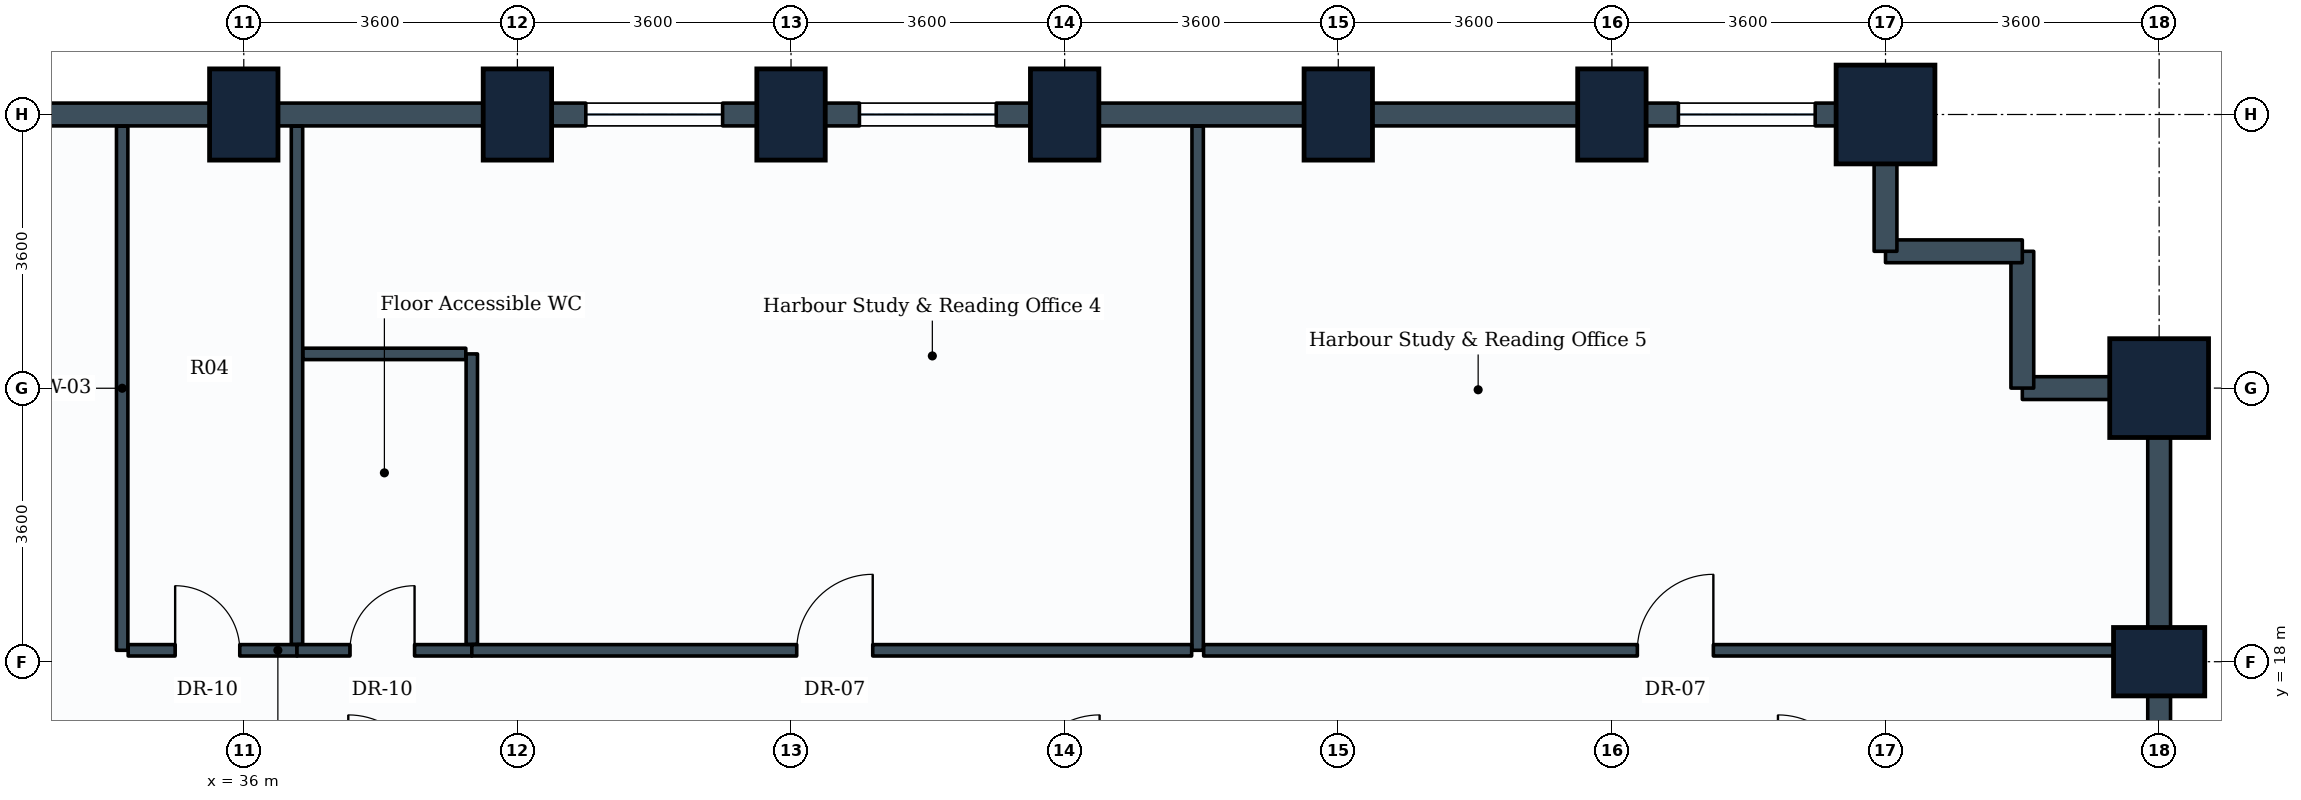
"""IFC4 building model, lengths in metres.
Left out: names, types, materials, properties, quantities, classifications, styles, units other than length and angle.
Written with IfcOpenShell. Run it as: python <this file> out.ifc"""

import sys

from ifc_helpers import new_model, si_unit, direction, frame, frame_2d, origin, origin_2d, place, context, subcontext, project, spatial, rectangle, extrude, element, fill, save


model = new_model("IFC4")
c1 = context("Model", 3, precision=1e-05, world=origin(), true_north=direction((0.0, 1.0)))
c2 = subcontext(c1, "Body", "Model", "MODEL_VIEW")
j1 = project(units=[si_unit("LENGTHUNIT", "METRE"), si_unit("PLANEANGLEUNIT", "RADIAN")], contexts=[c1])
p1 = place(None, origin())
s1 = spatial("IfcSite", under=j1, at=p1, CompositionType="ELEMENT")
p2 = place(p1, origin())
s2 = spatial("IfcBuilding", under=s1, at=p2, CompositionType="ELEMENT")
p3 = place(p2, frame((0.0, 0.0, 63.0)))
s3 = spatial("IfcBuildingStorey", under=s2, at=p3, CompositionType="ELEMENT", Elevation=63.0)
for number, where, z_axis, x_axis in (
    (1, (36.0, 25.2, 0.0), (0.0, 0.0, 1.0), (1.0, 0.0, 0.0)),
    (2, (39.6, 25.2, 0.0), (0.0, 0.0, 1.0), (1.0, 0.0, 0.0)),
    (3, (43.2, 25.2, 0.0), (0.0, 0.0, 1.0), (1.0, 0.0, 0.0)),
    (4, (46.8, 25.2, 0.0), (0.0, 0.0, 1.0), (1.0, 0.0, 0.0)),
    (5, (50.4, 25.2, 0.0), (0.0, 0.0, 1.0), (1.0, 0.0, 0.0)),
    (6, (54.0, 25.2, 0.0), (0.0, 0.0, 1.0), (1.0, 0.0, 0.0)),
):
    element("IfcColumn", number, at=place(p3, frame(where, z_axis=z_axis, x_axis=x_axis)), inside=s3, PredefinedType="COLUMN", context=c2, shape_type="SweptSolid", body=[
        extrude(rectangle(XDim=0.9, YDim=1.2, at=origin_2d()), origin(), (0.0, 0.0, 1.0), 3.9),
    ])
p4 = place(p3, frame((57.6, 25.2, 0.0), z_axis=(0.0, 0.0, 1.0), x_axis=(1.0, 0.0, 0.0)))
e7 = element("IfcColumn", 7, at=p4, inside=s3, PredefinedType="COLUMN", context=c2, shape_type="SweptSolid", body=[
    extrude(rectangle(XDim=1.3, YDim=1.3, at=origin_2d()), origin(), (0.0, 0.0, 1.0), 3.9),
])
p5 = place(p3, frame((61.2, 18.0, 0.0), z_axis=(0.0, 0.0, 1.0), x_axis=(0.0, 1.0, 0.0)))
e8 = element("IfcColumn", 8, at=p5, inside=s3, PredefinedType="COLUMN", context=c2, shape_type="SweptSolid", body=[
    extrude(rectangle(XDim=0.9, YDim=1.2, at=origin_2d()), origin(), (0.0, 0.0, 1.0), 3.9),
])
p6 = place(p3, frame((61.2, 21.6, 0.0), z_axis=(0.0, 0.0, 1.0), x_axis=(0.0, 1.0, 0.0)))
e9 = element("IfcColumn", 9, at=p6, inside=s3, PredefinedType="COLUMN", context=c2, shape_type="SweptSolid", body=[
    extrude(rectangle(XDim=1.3, YDim=1.3, at=origin_2d()), origin(), (0.0, 0.0, 1.0), 3.9),
])
for number, where, z_axis, x_axis in (
    (10, (61.2, 18.0, 0.0), (0.0, 0.0, 1.0), (0.0, -1.0, 0.0)),
    (11, (61.2, 21.6, 0.0), (0.0, 0.0, 1.0), (0.0, -1.0, 0.0)),
):
    element("IfcWall", number, at=place(p3, frame(where, z_axis=z_axis, x_axis=x_axis)), inside=s3, PredefinedType="STANDARD", context=c2, shape_type="SweptSolid", body=[
        extrude(rectangle(XDim=3.6, YDim=0.3, at=frame_2d((1.8, 0.0))), origin(), (0.0, 0.0, 1.0), 2.93),
    ])
p7 = place(p3, frame((61.2, 21.6, 0.0), z_axis=(0.0, 0.0, 1.0), x_axis=(-1.0, 0.0, 0.0)))
e12 = element("IfcWall", 12, at=p7, inside=s3, PredefinedType="STANDARD", context=c2, shape_type="SweptSolid", body=[
    extrude(rectangle(XDim=1.8, YDim=0.3, at=frame_2d((0.9, 0.0))), origin(), (0.0, 0.0, 1.0), 2.93),
])
for number, where, z_axis, x_axis in (
    (13, (59.4, 23.4, 0.0), (0.0, 0.0, 1.0), (0.0, -1.0, 0.0)),
    (14, (57.6, 23.4, 0.0), (0.0, 0.0, 1.0), (1.0, 0.0, 0.0)),
):
    element("IfcWall", number, at=place(p3, frame(where, z_axis=z_axis, x_axis=x_axis)), inside=s3, PredefinedType="STANDARD", context=c2, shape_type="SweptSolid", body=[
        extrude(rectangle(XDim=1.8, YDim=0.3, at=frame_2d((0.9, 0.0))), origin(), (0.0, 0.0, 1.0), 3.635),
    ])
p8 = place(p3, frame((57.6, 25.2, 0.0), z_axis=(0.0, 0.0, 1.0), x_axis=(0.0, -1.0, 0.0)))
e15 = element("IfcWall", 15, at=p8, inside=s3, PredefinedType="STANDARD", context=c2, shape_type="SweptSolid", body=[
    extrude(rectangle(XDim=1.8, YDim=0.3, at=frame_2d((0.9, 0.0))), origin(), (0.0, 0.0, 1.0), 2.93),
])
p9 = place(p3, frame((54.0, 25.2, 0.0), z_axis=(0.0, 0.0, 1.0), x_axis=(1.0, 0.0, 0.0)))
e16 = element("IfcWall", 16, at=p9, inside=s3, PredefinedType="STANDARD", context=c2, shape_type="SweptSolid", body=[
    extrude(rectangle(XDim=3.6, YDim=0.3, at=frame_2d((1.8, 0.0))), origin(), (0.0, 0.0, 1.0), 2.93),
])
p10 = place(p9, frame((0.875, 0.0, 0.85)))
e17 = element("IfcOpeningElement", 17, at=p10, cuts=e16, PredefinedType="OPENING", context=c2, shape_type="SweptSolid", body=[
    extrude(rectangle(XDim=1.8, YDim=1.35, at=frame_2d((0.9, 0.675))), frame((0.0, 0.16, 0.0), z_axis=(0.0, -1.0, 0.0), x_axis=(1.0, 0.0, 0.0)), (0.0, 0.0, 1.0), 0.32),
])
p11 = place(p3, frame((50.4, 25.2, 0.0), z_axis=(0.0, 0.0, 1.0), x_axis=(1.0, 0.0, 0.0)))
e18 = element("IfcWall", 18, at=p11, inside=s3, PredefinedType="STANDARD", context=c2, shape_type="SweptSolid", body=[
    extrude(rectangle(XDim=3.6, YDim=0.3, at=frame_2d((1.8, 0.0))), origin(), (0.0, 0.0, 1.0), 2.93),
])
p12 = place(p3, frame((46.8, 25.2, 0.0), z_axis=(0.0, 0.0, 1.0), x_axis=(1.0, 0.0, 0.0)))
e19 = element("IfcWall", 19, at=p12, inside=s3, PredefinedType="STANDARD", context=c2, shape_type="SweptSolid", body=[
    extrude(rectangle(XDim=3.6, YDim=0.3, at=frame_2d((1.8, 0.0))), origin(), (0.0, 0.0, 1.0), 2.93),
])
p13 = place(p3, frame((43.2, 25.2, 0.0), z_axis=(0.0, 0.0, 1.0), x_axis=(1.0, 0.0, 0.0)))
e20 = element("IfcWall", 20, at=p13, inside=s3, PredefinedType="STANDARD", context=c2, shape_type="SweptSolid", body=[
    extrude(rectangle(XDim=3.6, YDim=0.3, at=frame_2d((1.8, 0.0))), origin(), (0.0, 0.0, 1.0), 2.93),
])
p14 = place(p13, frame((0.9, 0.0, 0.85)))
e21 = element("IfcOpeningElement", 21, at=p14, cuts=e20, PredefinedType="OPENING", context=c2, shape_type="SweptSolid", body=[
    extrude(rectangle(XDim=1.8, YDim=1.35, at=frame_2d((0.9, 0.675))), frame((0.0, 0.16, 0.0), z_axis=(0.0, -1.0, 0.0), x_axis=(1.0, 0.0, 0.0)), (0.0, 0.0, 1.0), 0.32),
])
p15 = place(p3, frame((39.6, 25.2, 0.0), z_axis=(0.0, 0.0, 1.0), x_axis=(1.0, 0.0, 0.0)))
e22 = element("IfcWall", 22, at=p15, inside=s3, PredefinedType="STANDARD", context=c2, shape_type="SweptSolid", body=[
    extrude(rectangle(XDim=3.6, YDim=0.3, at=frame_2d((1.8, 0.0))), origin(), (0.0, 0.0, 1.0), 2.93),
])
p16 = place(p15, frame((0.9, 0.0, 0.85)))
e23 = element("IfcOpeningElement", 23, at=p16, cuts=e22, PredefinedType="OPENING", context=c2, shape_type="SweptSolid", body=[
    extrude(rectangle(XDim=1.8, YDim=1.35, at=frame_2d((0.9, 0.675))), frame((0.0, 0.16, 0.0), z_axis=(0.0, -1.0, 0.0), x_axis=(1.0, 0.0, 0.0)), (0.0, 0.0, 1.0), 0.32),
])
for number, where, z_axis, x_axis in (
    (24, (36.0, 25.2, 0.0), (0.0, 0.0, 1.0), (1.0, 0.0, 0.0)),
    (25, (32.4, 25.2, 0.0), (0.0, 0.0, 1.0), (1.0, 0.0, 0.0)),
):
    element("IfcWall", number, at=place(p3, frame(where, z_axis=z_axis, x_axis=x_axis)), inside=s3, PredefinedType="STANDARD", context=c2, shape_type="SweptSolid", body=[
        extrude(rectangle(XDim=3.6, YDim=0.3, at=frame_2d((1.8, 0.0))), origin(), (0.0, 0.0, 1.0), 2.93),
    ])
p17 = place(p3, frame((34.4, 18.15, 0.0), z_axis=(0.0, 0.0, 1.0), x_axis=(0.0, 1.0, 0.0)))
e26 = element("IfcWall", 26, at=p17, inside=s3, PredefinedType="PARTITIONING", context=c2, shape_type="SweptSolid", body=[
    extrude(rectangle(XDim=6.896, YDim=0.15, at=frame_2d((3.448, 0.0))), origin(), (0.0, 0.0, 1.0), 2.93),
])
p18 = place(p3, frame((34.479, 18.15, 0.0), z_axis=(0.0, 0.0, 1.0), x_axis=(1.0, 0.0, 0.0)))
e27 = element("IfcWall", 27, at=p18, inside=s3, PredefinedType="PARTITIONING", context=c2, shape_type="SweptSolid", body=[
    extrude(rectangle(XDim=2.221, YDim=0.15, at=frame_2d((1.11, 0.0))), origin(), (0.0, 0.0, 1.0), 3.08),
])
p19 = place(p18, frame((0.618, 0.0, 0.0)))
e28 = element("IfcOpeningElement", 28, at=p19, cuts=e27, PredefinedType="OPENING", context=c2, shape_type="SweptSolid", body=[
    extrude(rectangle(XDim=0.85, YDim=2.1, at=frame_2d((0.425, 1.05))), frame((0.0, 0.085, 0.0), z_axis=(0.0, -1.0, 0.0), x_axis=(1.0, 0.0, 0.0)), (0.0, 0.0, 1.0), 0.17),
])
p20 = place(p3, frame((36.7, 18.229, 0.0), z_axis=(0.0, 0.0, 1.0), x_axis=(0.0, 1.0, 0.0)))
e29 = element("IfcWall", 29, at=p20, inside=s3, PredefinedType="PARTITIONING", context=c2, shape_type="SweptSolid", body=[
    extrude(rectangle(XDim=6.817, YDim=0.15, at=frame_2d((3.408, 0.0))), origin(), (0.0, 0.0, 1.0), 2.93),
])
p21 = place(p3, frame((36.7, 18.15, 0.0), z_axis=(0.0, 0.0, 1.0), x_axis=(1.0, 0.0, 0.0)))
e30 = element("IfcWall", 30, at=p21, inside=s3, PredefinedType="PARTITIONING", context=c2, shape_type="SweptSolid", body=[
    extrude(rectangle(XDim=2.3, YDim=0.15, at=frame_2d((1.15, 0.0))), origin(), (0.0, 0.0, 1.0), 3.08),
])
p22 = place(p21, frame((0.697, 0.0, 0.0)))
e31 = element("IfcOpeningElement", 31, at=p22, cuts=e30, PredefinedType="OPENING", context=c2, shape_type="SweptSolid", body=[
    extrude(rectangle(XDim=0.85, YDim=2.1, at=frame_2d((0.425, 1.05))), frame((0.0, 0.085, 0.0), z_axis=(0.0, -1.0, 0.0), x_axis=(1.0, 0.0, 0.0)), (0.0, 0.0, 1.0), 0.17),
])
p23 = place(p3, frame((39.0, 18.229, 0.0), z_axis=(0.0, 0.0, 1.0), x_axis=(0.0, 1.0, 0.0)))
e32 = element("IfcWall", 32, at=p23, inside=s3, PredefinedType="PARTITIONING", context=c2, shape_type="SweptSolid", body=[
    extrude(rectangle(XDim=3.821, YDim=0.15, at=frame_2d((1.911, 0.0))), origin(), (0.0, 0.0, 1.0), 3.03),
])
p24 = place(p3, frame((36.779, 22.05, 0.0), z_axis=(0.0, 0.0, 1.0), x_axis=(1.0, 0.0, 0.0)))
e33 = element("IfcWall", 33, at=p24, inside=s3, PredefinedType="PARTITIONING", context=c2, shape_type="SweptSolid", body=[
    extrude(rectangle(XDim=2.142, YDim=0.15, at=frame_2d((1.071, 0.0))), origin(), (0.0, 0.0, 1.0), 3.635),
])
p25 = place(p3, frame((48.55, 18.15, 0.0), z_axis=(0.0, 0.0, 1.0), x_axis=(0.0, 1.0, 0.0)))
e34 = element("IfcWall", 34, at=p25, inside=s3, PredefinedType="PARTITIONING", context=c2, shape_type="SweptSolid", body=[
    extrude(rectangle(XDim=6.896, YDim=0.15, at=frame_2d((3.448, 0.0))), origin(), (0.0, 0.0, 1.0), 2.93),
])
p26 = place(p3, frame((39.0, 18.15, 0.0), z_axis=(0.0, 0.0, 1.0), x_axis=(1.0, 0.0, 0.0)))
e35 = element("IfcWall", 35, at=p26, inside=s3, PredefinedType="PARTITIONING", context=c2, shape_type="SweptSolid", body=[
    extrude(rectangle(XDim=9.471, YDim=0.15, at=frame_2d((4.735, 0.0))), origin(), (0.0, 0.0, 1.0), 3.03),
])
p27 = place(p26, frame((4.275, 0.0, 0.0)))
e36 = element("IfcOpeningElement", 36, at=p27, cuts=e35, PredefinedType="OPENING", context=c2, shape_type="SweptSolid", body=[
    extrude(rectangle(XDim=1.0, YDim=2.1, at=frame_2d((0.5, 1.05))), frame((0.0, 0.085, 0.0), z_axis=(0.0, -1.0, 0.0), x_axis=(1.0, 0.0, 0.0)), (0.0, 0.0, 1.0), 0.17),
])
p28 = place(p3, frame((48.629, 18.15, 0.0), z_axis=(0.0, 0.0, 1.0), x_axis=(1.0, 0.0, 0.0)))
e37 = element("IfcWall", 37, at=p28, inside=s3, PredefinedType="PARTITIONING", context=c2, shape_type="SweptSolid", body=[
    extrude(rectangle(XDim=12.417, YDim=0.15, at=frame_2d((6.208, 0.0))), origin(), (0.0, 0.0, 1.0), 2.93),
])
p29 = place(p28, frame((5.706, 0.0, 0.0)))
e38 = element("IfcOpeningElement", 38, at=p29, cuts=e37, PredefinedType="OPENING", context=c2, shape_type="SweptSolid", body=[
    extrude(rectangle(XDim=1.0, YDim=2.1, at=frame_2d((0.5, 1.05))), frame((0.0, 0.085, 0.0), z_axis=(0.0, -1.0, 0.0), x_axis=(1.0, 0.0, 0.0)), (0.0, 0.0, 1.0), 0.17),
])
p30 = place(p10, origin())
e39 = element("IfcWindow", 39, at=p30, inside=s3, PartitioningType="SINGLE_PANEL", PredefinedType="WINDOW", context=c2, shape_type="SweptSolid", body=[
    extrude(rectangle(XDim=1.8, YDim=1.35, at=frame_2d((0.9, 0.675))), frame((0.0, 0.03, 0.0), z_axis=(0.0, -1.0, 0.0), x_axis=(1.0, 0.0, 0.0)), (0.0, 0.0, 1.0), 0.06),
])
fill(e17, e39)
p31 = place(p14, origin())
e40 = element("IfcWindow", 40, at=p31, inside=s3, PartitioningType="SINGLE_PANEL", PredefinedType="WINDOW", context=c2, shape_type="SweptSolid", body=[
    extrude(rectangle(XDim=1.8, YDim=1.35, at=frame_2d((0.9, 0.675))), frame((0.0, 0.03, 0.0), z_axis=(0.0, -1.0, 0.0), x_axis=(1.0, 0.0, 0.0)), (0.0, 0.0, 1.0), 0.06),
])
fill(e21, e40)
p32 = place(p16, origin())
e41 = element("IfcWindow", 41, at=p32, inside=s3, PartitioningType="SINGLE_PANEL", PredefinedType="WINDOW", context=c2, shape_type="SweptSolid", body=[
    extrude(rectangle(XDim=1.8, YDim=1.35, at=frame_2d((0.9, 0.675))), frame((0.0, 0.03, 0.0), z_axis=(0.0, -1.0, 0.0), x_axis=(1.0, 0.0, 0.0)), (0.0, 0.0, 1.0), 0.06),
])
fill(e23, e41)
p33 = place(p19, origin())
e42 = element("IfcDoor", 42, at=p33, inside=s3, OperationType="SINGLE_SWING_LEFT", PredefinedType="DOOR", context=c2, shape_type="SweptSolid", body=[
    extrude(rectangle(XDim=0.85, YDim=2.1, at=frame_2d((0.425, 1.05))), frame((0.0, 0.025, 0.0), z_axis=(0.0, -1.0, 0.0), x_axis=(1.0, 0.0, 0.0)), (0.0, 0.0, 1.0), 0.05),
])
fill(e28, e42)
p34 = place(p22, origin())
e43 = element("IfcDoor", 43, at=p34, inside=s3, OperationType="SINGLE_SWING_RIGHT", PredefinedType="DOOR", context=c2, shape_type="SweptSolid", body=[
    extrude(rectangle(XDim=0.85, YDim=2.1, at=frame_2d((0.425, 1.05))), frame((0.0, 0.025, 0.0), z_axis=(0.0, -1.0, 0.0), x_axis=(1.0, 0.0, 0.0)), (0.0, 0.0, 1.0), 0.05),
])
fill(e31, e43)
p35 = place(p27, origin())
e44 = element("IfcDoor", 44, at=p35, inside=s3, OperationType="SINGLE_SWING_RIGHT", PredefinedType="DOOR", context=c2, shape_type="SweptSolid", body=[
    extrude(rectangle(XDim=1.0, YDim=2.1, at=frame_2d((0.5, 1.05))), frame((0.0, 0.025, 0.0), z_axis=(0.0, -1.0, 0.0), x_axis=(1.0, 0.0, 0.0)), (0.0, 0.0, 1.0), 0.05),
])
fill(e36, e44)
p36 = place(p29, origin())
e45 = element("IfcDoor", 45, at=p36, inside=s3, OperationType="SINGLE_SWING_RIGHT", PredefinedType="DOOR", context=c2, shape_type="SweptSolid", body=[
    extrude(rectangle(XDim=1.0, YDim=2.1, at=frame_2d((0.5, 1.05))), frame((0.0, 0.025, 0.0), z_axis=(0.0, -1.0, 0.0), x_axis=(1.0, 0.0, 0.0)), (0.0, 0.0, 1.0), 0.05),
])
fill(e38, e45)
save(model, sys.argv[1])
